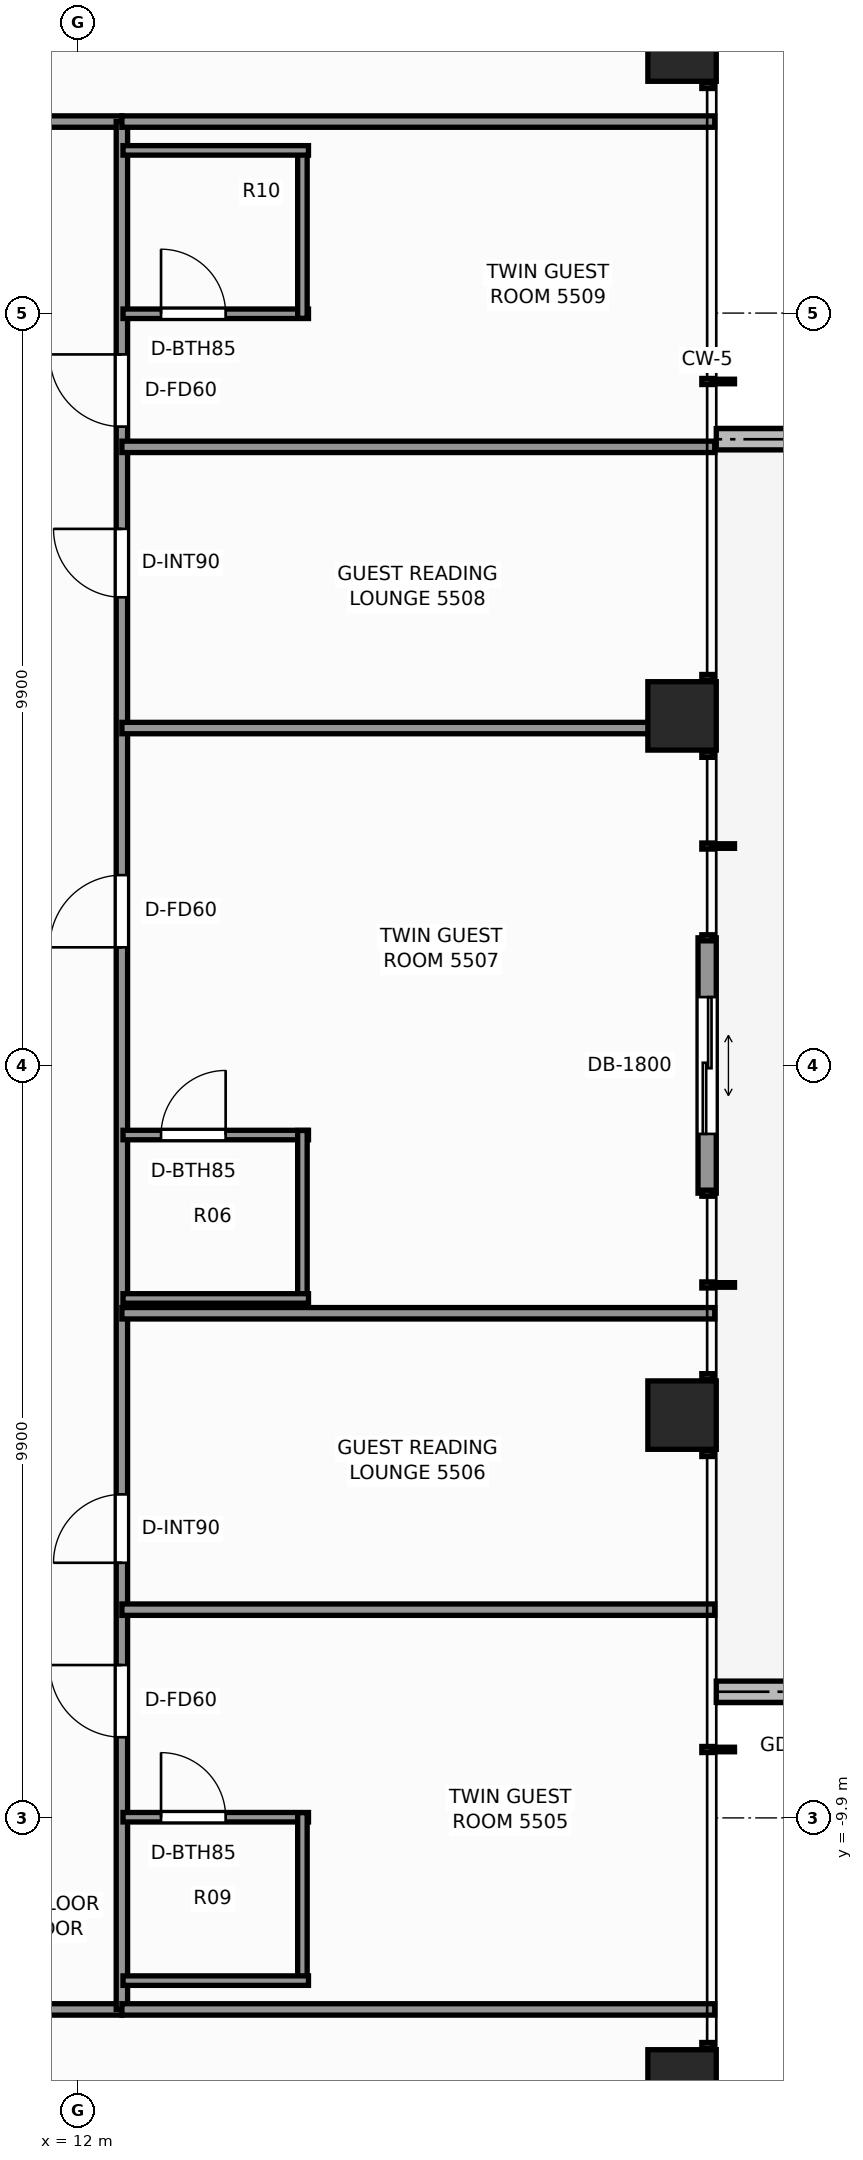
"""IFC4 building model, lengths in metres.
Left out: names, types, materials, properties, quantities, classifications, styles, units other than length and angle.
Written with IfcOpenShell. Run it as: python <this file> out.ifc"""

import sys

from ifc_helpers import new_model, si_unit, direction, frame, frame_2d, origin, origin_2d, place, context, subcontext, project, spatial, rectangle, extrude, element, fill, save


model = new_model("IFC4")
c1 = context("Model", 3, precision=1e-05, world=origin(), true_north=direction((0.0, 1.0)))
c2 = subcontext(c1, "Body", "Model", "MODEL_VIEW")
j1 = project(units=[si_unit("LENGTHUNIT", "METRE"), si_unit("PLANEANGLEUNIT", "RADIAN")], contexts=[c1])
p1 = place(None, origin())
s1 = spatial("IfcSite", under=j1, at=p1, CompositionType="ELEMENT")
p2 = place(p1, origin())
s2 = spatial("IfcBuilding", under=s1, at=p2, CompositionType="ELEMENT")
p3 = place(p2, frame((0.0, 0.0, 189.9)))
s3 = spatial("IfcBuildingStorey", under=s2, at=p3, CompositionType="ELEMENT", Elevation=189.9)
for number, where, z_axis, x_axis in (
    (1, (19.95, -13.4, 0.0), (0.0, 0.0, 1.0), (1.0, 0.0, 0.0)),
    (2, (19.95, -4.6, 0.0), (0.0, 0.0, 1.0), (1.0, 0.0, 0.0)),
    (3, (19.95, 4.6, 0.0), (0.0, 0.0, 1.0), (1.0, 0.0, 0.0)),
    (4, (19.95, 13.4, 0.0), (0.0, 0.0, 1.0), (1.0, 0.0, 0.0)),
):
    element("IfcColumn", number, at=place(p3, frame(where, z_axis=z_axis, x_axis=x_axis)), inside=s3, PredefinedType="COLUMN", context=c2, shape_type="SweptSolid", body=[
        extrude(rectangle(XDim=0.9, YDim=0.9, at=origin_2d()), origin(), (0.0, 0.0, 1.0), 3.3),
    ])
p4 = place(p3, frame((23.767, 8.24, -0.04), z_axis=(0.0, 0.0, 1.0), x_axis=(-1.0, 0.0, 0.0)))
e5 = element("IfcWall", 5, at=p4, inside=s3, PredefinedType="PARAPET", context=c2, shape_type="SweptSolid", body=[
    extrude(rectangle(XDim=3.367, YDim=0.28, at=frame_2d((1.684, 0.0))), origin(), (0.0, 0.0, 1.0), 0.42),
])
p5 = place(p3, frame((20.4, -8.24, -0.04), z_axis=(0.0, 0.0, 1.0), x_axis=(1.0, 0.0, 0.0)))
e6 = element("IfcWall", 6, at=p5, inside=s3, PredefinedType="PARAPET", context=c2, shape_type="SweptSolid", body=[
    extrude(rectangle(XDim=2.34, YDim=0.28, at=frame_2d((1.17, 0.0))), origin(), (0.0, 0.0, 1.0), 0.42),
])
p6 = place(p3, frame((20.28, 1.68, 0.0), z_axis=(0.0, 0.0, 1.0), x_axis=(0.0, -1.0, 0.0)))
e7 = element("IfcWall", 7, at=p6, inside=s3, PredefinedType="STANDARD", context=c2, shape_type="SweptSolid", body=[
    extrude(rectangle(XDim=3.36, YDim=0.24, at=frame_2d((1.68, 0.0))), origin(), (0.0, 0.0, 1.0), 3.08),
])
p7 = place(p6, frame((0.78, 0.0, 0.0)))
e8 = element("IfcOpeningElement", 8, at=p7, cuts=e7, PredefinedType="OPENING", context=c2, shape_type="SweptSolid", body=[
    extrude(rectangle(XDim=1.8, YDim=2.2, at=frame_2d((0.9, 1.1))), frame((0.0, 0.13, 0.0), z_axis=(0.0, -1.0, 0.0), x_axis=(1.0, 0.0, 0.0)), (0.0, 0.0, 1.0), 0.26),
])
p8 = place(p3, frame((-12.42, -12.42, 0.0), z_axis=(0.0, 0.0, 1.0), x_axis=(1.0, 0.0, 0.0)))
e9 = element("IfcWall", 9, at=p8, inside=s3, PredefinedType="PARTITIONING", context=c2, shape_type="SweptSolid", body=[
    extrude(rectangle(XDim=25.0, YDim=0.15, at=frame_2d((12.5, 0.0))), origin(), (0.0, 0.0, 1.0), 2.369),
])
p9 = place(p8, frame((1.633, 0.0, 0.0)))
e10 = element("IfcOpeningElement", 10, at=p9, cuts=e9, PredefinedType="OPENING", context=c2, shape_type="SweptSolid", body=[
    extrude(rectangle(XDim=0.9, YDim=2.06, at=frame_2d((0.45, 1.03))), frame((0.0, 0.085, 0.0), z_axis=(0.0, -1.0, 0.0), x_axis=(1.0, 0.0, 0.0)), (0.0, 0.0, 1.0), 0.17),
])
p10 = place(p8, frame((5.113, 0.0, 0.0)))
e11 = element("IfcOpeningElement", 11, at=p10, cuts=e9, PredefinedType="OPENING", context=c2, shape_type="SweptSolid", body=[
    extrude(rectangle(XDim=0.9, YDim=2.06, at=frame_2d((0.45, 1.03))), frame((0.0, 0.085, 0.0), z_axis=(0.0, -1.0, 0.0), x_axis=(1.0, 0.0, 0.0)), (0.0, 0.0, 1.0), 0.17),
])
p11 = place(p8, frame((8.892, 0.0, 0.0)))
e12 = element("IfcOpeningElement", 12, at=p11, cuts=e9, PredefinedType="OPENING", context=c2, shape_type="SweptSolid", body=[
    extrude(rectangle(XDim=0.9, YDim=2.06, at=frame_2d((0.45, 1.03))), frame((0.0, 0.085, 0.0), z_axis=(0.0, -1.0, 0.0), x_axis=(1.0, 0.0, 0.0)), (0.0, 0.0, 1.0), 0.17),
])
p12 = place(p8, frame((13.097, 0.0, 0.0)))
e13 = element("IfcOpeningElement", 13, at=p12, cuts=e9, PredefinedType="OPENING", context=c2, shape_type="SweptSolid", body=[
    extrude(rectangle(XDim=0.95, YDim=2.06, at=frame_2d((0.475, 1.03))), frame((0.0, 0.085, 0.0), z_axis=(0.0, -1.0, 0.0), x_axis=(1.0, 0.0, 0.0)), (0.0, 0.0, 1.0), 0.17),
])
p13 = place(p8, frame((18.646, 0.0, 0.0)))
e14 = element("IfcOpeningElement", 14, at=p13, cuts=e9, PredefinedType="OPENING", context=c2, shape_type="SweptSolid", body=[
    extrude(rectangle(XDim=0.9, YDim=2.06, at=frame_2d((0.45, 1.03))), frame((0.0, 0.085, 0.0), z_axis=(0.0, -1.0, 0.0), x_axis=(1.0, 0.0, 0.0)), (0.0, 0.0, 1.0), 0.17),
])
p14 = place(p8, frame((20.981, 0.0, 0.0)))
e15 = element("IfcOpeningElement", 15, at=p14, cuts=e9, PredefinedType="OPENING", context=c2, shape_type="SweptSolid", body=[
    extrude(rectangle(XDim=0.9, YDim=2.06, at=frame_2d((0.45, 1.03))), frame((0.0, 0.085, 0.0), z_axis=(0.0, -1.0, 0.0), x_axis=(1.0, 0.0, 0.0)), (0.0, 0.0, 1.0), 0.17),
])
p15 = place(p3, frame((-12.42, 12.42, 0.0), z_axis=(0.0, 0.0, 1.0), x_axis=(1.0, 0.0, 0.0)))
e16 = element("IfcWall", 16, at=p15, inside=s3, PredefinedType="PARTITIONING", context=c2, shape_type="SweptSolid", body=[
    extrude(rectangle(XDim=25.0, YDim=0.15, at=frame_2d((12.5, 0.0))), origin(), (0.0, 0.0, 1.0), 2.369),
])
p16 = place(p15, frame((4.435, 0.0, 0.0)))
e17 = element("IfcOpeningElement", 17, at=p16, cuts=e16, PredefinedType="OPENING", context=c2, shape_type="SweptSolid", body=[
    extrude(rectangle(XDim=0.9, YDim=2.06, at=frame_2d((0.45, 1.03))), frame((0.0, 0.085, 0.0), z_axis=(0.0, -1.0, 0.0), x_axis=(1.0, 0.0, 0.0)), (0.0, 0.0, 1.0), 0.17),
])
p17 = place(p15, frame((13.968, 0.0, 0.0)))
e18 = element("IfcOpeningElement", 18, at=p17, cuts=e16, PredefinedType="OPENING", context=c2, shape_type="SweptSolid", body=[
    extrude(rectangle(XDim=0.95, YDim=2.06, at=frame_2d((0.475, 1.03))), frame((0.0, 0.085, 0.0), z_axis=(0.0, -1.0, 0.0), x_axis=(1.0, 0.0, 0.0)), (0.0, 0.0, 1.0), 0.17),
])
p18 = place(p15, frame((19.505, 0.0, 0.0)))
e19 = element("IfcOpeningElement", 19, at=p18, cuts=e16, PredefinedType="OPENING", context=c2, shape_type="SweptSolid", body=[
    extrude(rectangle(XDim=0.9, YDim=2.06, at=frame_2d((0.45, 1.03))), frame((0.0, 0.085, 0.0), z_axis=(0.0, -1.0, 0.0), x_axis=(1.0, 0.0, 0.0)), (0.0, 0.0, 1.0), 0.17),
])
p19 = place(p3, frame((12.58, -12.42, 0.0), z_axis=(0.0, 0.0, 1.0), x_axis=(0.0, 1.0, 0.0)))
e20 = element("IfcWall", 20, at=p19, inside=s3, PredefinedType="PARTITIONING", context=c2, shape_type="SweptSolid", body=[
    extrude(rectangle(XDim=24.84, YDim=0.15, at=frame_2d((12.42, 0.0))), origin(), (0.0, 0.0, 1.0), 2.369),
])
p20 = place(p19, frame((3.581, 0.0, 0.0)))
e21 = element("IfcOpeningElement", 21, at=p20, cuts=e20, PredefinedType="OPENING", context=c2, shape_type="SweptSolid", body=[
    extrude(rectangle(XDim=0.95, YDim=2.06, at=frame_2d((0.475, 1.03))), frame((0.0, 0.085, 0.0), z_axis=(0.0, -1.0, 0.0), x_axis=(1.0, 0.0, 0.0)), (0.0, 0.0, 1.0), 0.17),
])
p21 = place(p19, frame((5.877, 0.0, 0.0)))
e22 = element("IfcOpeningElement", 22, at=p21, cuts=e20, PredefinedType="OPENING", context=c2, shape_type="SweptSolid", body=[
    extrude(rectangle(XDim=0.9, YDim=2.06, at=frame_2d((0.45, 1.03))), frame((0.0, 0.085, 0.0), z_axis=(0.0, -1.0, 0.0), x_axis=(1.0, 0.0, 0.0)), (0.0, 0.0, 1.0), 0.17),
])
p22 = place(p19, frame((13.975, 0.0, 0.0)))
e23 = element("IfcOpeningElement", 23, at=p22, cuts=e20, PredefinedType="OPENING", context=c2, shape_type="SweptSolid", body=[
    extrude(rectangle(XDim=0.95, YDim=2.06, at=frame_2d((0.475, 1.03))), frame((0.0, 0.085, 0.0), z_axis=(0.0, -1.0, 0.0), x_axis=(1.0, 0.0, 0.0)), (0.0, 0.0, 1.0), 0.17),
])
p23 = place(p19, frame((18.581, 0.0, 0.0)))
e24 = element("IfcOpeningElement", 24, at=p23, cuts=e20, PredefinedType="OPENING", context=c2, shape_type="SweptSolid", body=[
    extrude(rectangle(XDim=0.9, YDim=2.06, at=frame_2d((0.45, 1.03))), frame((0.0, 0.085, 0.0), z_axis=(0.0, -1.0, 0.0), x_axis=(1.0, 0.0, 0.0)), (0.0, 0.0, 1.0), 0.17),
])
p24 = place(p19, frame((20.826, 0.0, 0.0)))
e25 = element("IfcOpeningElement", 25, at=p24, cuts=e20, PredefinedType="OPENING", context=c2, shape_type="SweptSolid", body=[
    extrude(rectangle(XDim=0.95, YDim=2.06, at=frame_2d((0.475, 1.03))), frame((0.0, 0.085, 0.0), z_axis=(0.0, -1.0, 0.0), x_axis=(1.0, 0.0, 0.0)), (0.0, 0.0, 1.0), 0.17),
])
for number, where, z_axis, x_axis in (
    (26, (12.58, -12.42, 0.0), (0.0, 0.0, 1.0), (1.0, 0.0, 0.0)),
    (27, (12.58, 12.42, 0.0), (0.0, 0.0, 1.0), (1.0, 0.0, 0.0)),
):
    element("IfcWall", number, at=place(p3, frame(where, z_axis=z_axis, x_axis=x_axis)), inside=s3, PredefinedType="PARTITIONING", context=c2, shape_type="SweptSolid", body=[
        extrude(rectangle(XDim=7.8, YDim=0.15, at=frame_2d((3.9, 0.0))), origin(), (0.0, 0.0, 1.0), 2.369),
    ])
p25 = place(p3, frame((12.58, -7.16, 0.0), z_axis=(0.0, 0.0, 1.0), x_axis=(1.0, 0.0, 0.0)))
e28 = element("IfcWall", 28, at=p25, inside=s3, PredefinedType="PARTITIONING", context=c2, shape_type="SweptSolid", body=[
    extrude(rectangle(XDim=7.8, YDim=0.15, at=frame_2d((3.9, 0.0))), origin(), (0.0, 0.0, 1.0), 2.453),
])
p26 = place(p3, frame((12.595, -9.891, 0.0), z_axis=(0.0, 0.0, 1.0), x_axis=(1.0, 0.0, 0.0)))
e29 = element("IfcWall", 29, at=p26, inside=s3, PredefinedType="PARTITIONING", context=c2, shape_type="SweptSolid", body=[
    extrude(rectangle(XDim=2.44, YDim=0.125, at=frame_2d((1.22, 0.0))), origin(), (0.0, 0.0, 1.0), 3.08),
])
p27 = place(p26, frame((0.5, 0.0, 0.0)))
e30 = element("IfcOpeningElement", 30, at=p27, cuts=e29, PredefinedType="OPENING", context=c2, shape_type="SweptSolid", body=[
    extrude(rectangle(XDim=0.85, YDim=2.03, at=frame_2d((0.425, 1.015))), frame((0.0, 0.073, 0.0), z_axis=(0.0, -1.0, 0.0), x_axis=(1.0, 0.0, 0.0)), (0.0, 0.0, 1.0), 0.145),
])
p28 = place(p3, frame((14.955, -12.101, 0.0), z_axis=(0.0, 0.0, 1.0), x_axis=(0.0, 1.0, 0.0)))
e31 = element("IfcWall", 31, at=p28, inside=s3, PredefinedType="PARTITIONING", context=c2, shape_type="SweptSolid", body=[
    extrude(rectangle(XDim=2.27, YDim=0.125, at=frame_2d((1.135, 0.0))), origin(), (0.0, 0.0, 1.0), 2.369),
])
p29 = place(p3, frame((12.595, -12.041, 0.0), z_axis=(0.0, 0.0, 1.0), x_axis=(1.0, 0.0, 0.0)))
e32 = element("IfcWall", 32, at=p29, inside=s3, PredefinedType="PARTITIONING", context=c2, shape_type="SweptSolid", body=[
    extrude(rectangle(XDim=2.44, YDim=0.125, at=frame_2d((1.22, 0.0))), origin(), (0.0, 0.0, 1.0), 3.08),
])
p30 = place(p3, frame((12.58, -3.26, 0.0), z_axis=(0.0, 0.0, 1.0), x_axis=(1.0, 0.0, 0.0)))
e33 = element("IfcWall", 33, at=p30, inside=s3, PredefinedType="PARTITIONING", context=c2, shape_type="SweptSolid", body=[
    extrude(rectangle(XDim=7.8, YDim=0.15, at=frame_2d((3.9, 0.0))), origin(), (0.0, 0.0, 1.0), 2.453),
])
p31 = place(p3, frame((12.58, 4.44, 0.0), z_axis=(0.0, 0.0, 1.0), x_axis=(1.0, 0.0, 0.0)))
e34 = element("IfcWall", 34, at=p31, inside=s3, PredefinedType="PARTITIONING", context=c2, shape_type="SweptSolid", body=[
    extrude(rectangle(XDim=7.8, YDim=0.15, at=frame_2d((3.9, 0.0))), origin(), (0.0, 0.0, 1.0), 2.369),
])
p32 = place(p3, frame((12.595, -0.915, 0.0), z_axis=(0.0, 0.0, 1.0), x_axis=(1.0, 0.0, 0.0)))
e35 = element("IfcWall", 35, at=p32, inside=s3, PredefinedType="PARTITIONING", context=c2, shape_type="SweptSolid", body=[
    extrude(rectangle(XDim=2.44, YDim=0.125, at=frame_2d((1.22, 0.0))), origin(), (0.0, 0.0, 1.0), 3.08),
])
p33 = place(p32, frame((0.5, 0.0, 0.0)))
e36 = element("IfcOpeningElement", 36, at=p33, cuts=e35, PredefinedType="OPENING", context=c2, shape_type="SweptSolid", body=[
    extrude(rectangle(XDim=0.85, YDim=2.03, at=frame_2d((0.425, 1.015))), frame((0.0, 0.073, 0.0), z_axis=(0.0, -1.0, 0.0), x_axis=(1.0, 0.0, 0.0)), (0.0, 0.0, 1.0), 0.145),
])
p34 = place(p3, frame((14.955, -3.125, 0.0), z_axis=(0.0, 0.0, 1.0), x_axis=(0.0, 1.0, 0.0)))
e37 = element("IfcWall", 37, at=p34, inside=s3, PredefinedType="PARTITIONING", context=c2, shape_type="SweptSolid", body=[
    extrude(rectangle(XDim=2.27, YDim=0.125, at=frame_2d((1.135, 0.0))), origin(), (0.0, 0.0, 1.0), 3.08),
])
p35 = place(p3, frame((12.595, -3.065, 0.0), z_axis=(0.0, 0.0, 1.0), x_axis=(1.0, 0.0, 0.0)))
e38 = element("IfcWall", 38, at=p35, inside=s3, PredefinedType="PARTITIONING", context=c2, shape_type="SweptSolid", body=[
    extrude(rectangle(XDim=2.44, YDim=0.125, at=frame_2d((1.22, 0.0))), origin(), (0.0, 0.0, 1.0), 3.08),
])
p36 = place(p3, frame((12.58, 8.14, 0.0), z_axis=(0.0, 0.0, 1.0), x_axis=(1.0, 0.0, 0.0)))
e39 = element("IfcWall", 39, at=p36, inside=s3, PredefinedType="PARTITIONING", context=c2, shape_type="SweptSolid", body=[
    extrude(rectangle(XDim=7.8, YDim=0.15, at=frame_2d((3.9, 0.0))), origin(), (0.0, 0.0, 1.0), 2.453),
])
p37 = place(p3, frame((12.595, 9.891, 0.0), z_axis=(0.0, 0.0, 1.0), x_axis=(1.0, 0.0, 0.0)))
e40 = element("IfcWall", 40, at=p37, inside=s3, PredefinedType="PARTITIONING", context=c2, shape_type="SweptSolid", body=[
    extrude(rectangle(XDim=2.44, YDim=0.125, at=frame_2d((1.22, 0.0))), origin(), (0.0, 0.0, 1.0), 3.08),
])
p38 = place(p37, frame((0.5, 0.0, 0.0)))
e41 = element("IfcOpeningElement", 41, at=p38, cuts=e40, PredefinedType="OPENING", context=c2, shape_type="SweptSolid", body=[
    extrude(rectangle(XDim=0.85, YDim=2.03, at=frame_2d((0.425, 1.015))), frame((0.0, 0.073, 0.0), z_axis=(0.0, -1.0, 0.0), x_axis=(1.0, 0.0, 0.0)), (0.0, 0.0, 1.0), 0.145),
])
p39 = place(p3, frame((14.955, 9.831, 0.0), z_axis=(0.0, 0.0, 1.0), x_axis=(0.0, 1.0, 0.0)))
e42 = element("IfcWall", 42, at=p39, inside=s3, PredefinedType="PARTITIONING", context=c2, shape_type="SweptSolid", body=[
    extrude(rectangle(XDim=2.27, YDim=0.125, at=frame_2d((1.135, 0.0))), origin(), (0.0, 0.0, 1.0), 2.369),
])
p40 = place(p3, frame((12.595, 12.041, 0.0), z_axis=(0.0, 0.0, 1.0), x_axis=(1.0, 0.0, 0.0)))
e43 = element("IfcWall", 43, at=p40, inside=s3, PredefinedType="PARTITIONING", context=c2, shape_type="SweptSolid", body=[
    extrude(rectangle(XDim=2.44, YDim=0.125, at=frame_2d((1.22, 0.0))), origin(), (0.0, 0.0, 1.0), 3.08),
])
p41 = place(p7, origin())
e44 = element("IfcDoor", 44, at=p41, inside=s3, OperationType="DOUBLE_DOOR_SLIDING", PredefinedType="DOOR", context=c2, shape_type="SweptSolid", body=[
    extrude(rectangle(XDim=1.8, YDim=2.2, at=frame_2d((0.9, 1.1))), frame((0.0, 0.025, 0.0), z_axis=(0.0, -1.0, 0.0), x_axis=(1.0, 0.0, 0.0)), (0.0, 0.0, 1.0), 0.05),
])
fill(e8, e44)
p42 = place(p27, origin())
e45 = element("IfcDoor", 45, at=p42, inside=s3, OperationType="SINGLE_SWING_LEFT", PredefinedType="DOOR", context=c2, shape_type="SweptSolid", body=[
    extrude(rectangle(XDim=0.85, YDim=2.03, at=frame_2d((0.425, 1.015))), frame((0.0, 0.025, 0.0), z_axis=(0.0, -1.0, 0.0), x_axis=(1.0, 0.0, 0.0)), (0.0, 0.0, 1.0), 0.05),
])
fill(e30, e45)
p43 = place(p20, origin())
e46 = element("IfcDoor", 46, at=p43, inside=s3, OperationType="SINGLE_SWING_RIGHT", PredefinedType="DOOR", context=c2, shape_type="SweptSolid", body=[
    extrude(rectangle(XDim=0.95, YDim=2.06, at=frame_2d((0.475, 1.03))), frame((0.0, 0.025, 0.0), z_axis=(0.0, -1.0, 0.0), x_axis=(1.0, 0.0, 0.0)), (0.0, 0.0, 1.0), 0.05),
])
fill(e21, e46)
p44 = place(p21, origin())
e47 = element("IfcDoor", 47, at=p44, inside=s3, OperationType="SINGLE_SWING_LEFT", PredefinedType="DOOR", context=c2, shape_type="SweptSolid", body=[
    extrude(rectangle(XDim=0.9, YDim=2.06, at=frame_2d((0.45, 1.03))), frame((0.0, 0.025, 0.0), z_axis=(0.0, -1.0, 0.0), x_axis=(1.0, 0.0, 0.0)), (0.0, 0.0, 1.0), 0.05),
])
fill(e22, e47)
p45 = place(p33, origin())
e48 = element("IfcDoor", 48, at=p45, inside=s3, OperationType="SINGLE_SWING_RIGHT", PredefinedType="DOOR", context=c2, shape_type="SweptSolid", body=[
    extrude(rectangle(XDim=0.85, YDim=2.03, at=frame_2d((0.425, 1.015))), frame((0.0, 0.025, 0.0), z_axis=(0.0, -1.0, 0.0), x_axis=(1.0, 0.0, 0.0)), (0.0, 0.0, 1.0), 0.05),
])
fill(e36, e48)
p46 = place(p22, origin())
e49 = element("IfcDoor", 49, at=p46, inside=s3, OperationType="SINGLE_SWING_LEFT", PredefinedType="DOOR", context=c2, shape_type="SweptSolid", body=[
    extrude(rectangle(XDim=0.95, YDim=2.06, at=frame_2d((0.475, 1.03))), frame((0.0, 0.025, 0.0), z_axis=(0.0, -1.0, 0.0), x_axis=(1.0, 0.0, 0.0)), (0.0, 0.0, 1.0), 0.05),
])
fill(e23, e49)
p47 = place(p23, origin())
e50 = element("IfcDoor", 50, at=p47, inside=s3, OperationType="SINGLE_SWING_RIGHT", PredefinedType="DOOR", context=c2, shape_type="SweptSolid", body=[
    extrude(rectangle(XDim=0.9, YDim=2.06, at=frame_2d((0.45, 1.03))), frame((0.0, 0.025, 0.0), z_axis=(0.0, -1.0, 0.0), x_axis=(1.0, 0.0, 0.0)), (0.0, 0.0, 1.0), 0.05),
])
fill(e24, e50)
p48 = place(p38, origin())
e51 = element("IfcDoor", 51, at=p48, inside=s3, OperationType="SINGLE_SWING_LEFT", PredefinedType="DOOR", context=c2, shape_type="SweptSolid", body=[
    extrude(rectangle(XDim=0.85, YDim=2.03, at=frame_2d((0.425, 1.015))), frame((0.0, 0.025, 0.0), z_axis=(0.0, -1.0, 0.0), x_axis=(1.0, 0.0, 0.0)), (0.0, 0.0, 1.0), 0.05),
])
fill(e41, e51)
p49 = place(p24, origin())
e52 = element("IfcDoor", 52, at=p49, inside=s3, OperationType="SINGLE_SWING_RIGHT", PredefinedType="DOOR", context=c2, shape_type="SweptSolid", body=[
    extrude(rectangle(XDim=0.95, YDim=2.06, at=frame_2d((0.475, 1.03))), frame((0.0, 0.025, 0.0), z_axis=(0.0, -1.0, 0.0), x_axis=(1.0, 0.0, 0.0)), (0.0, 0.0, 1.0), 0.05),
])
fill(e25, e52)
save(model, sys.argv[1])
